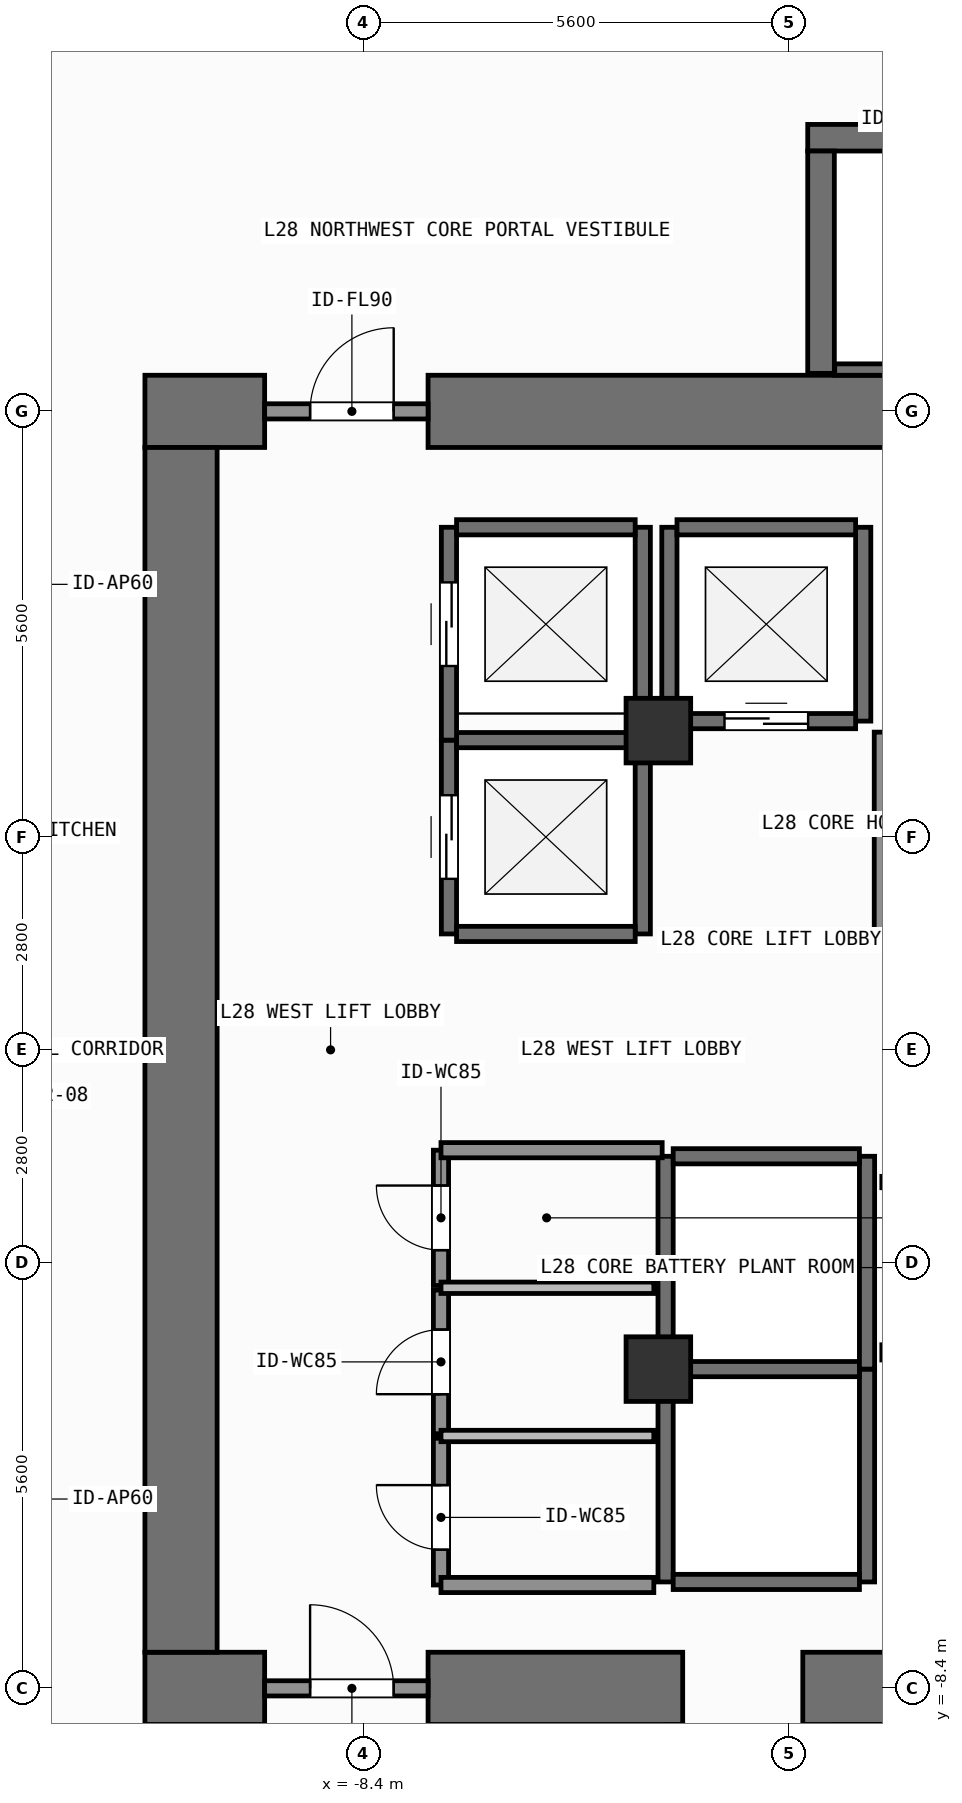
"""IFC4 building model, lengths in metres.
Left out: names, types, materials, properties, quantities, classifications, styles, units other than length and angle.
Written with IfcOpenShell. Run it as: python <this file> out.ifc"""

import sys

from ifc_helpers import new_model, si_unit, direction, frame, frame_2d, origin, origin_2d, place, context, subcontext, project, spatial, rectangle, extrude, element, fill, save


model = new_model("IFC4")
c1 = context("Model", 3, precision=1e-05, world=origin(), true_north=direction((0.0, 1.0)))
c2 = subcontext(c1, "Body", "Model", "MODEL_VIEW")
j1 = project(units=[si_unit("LENGTHUNIT", "METRE"), si_unit("PLANEANGLEUNIT", "RADIAN")], contexts=[c1])
p1 = place(None, origin())
s1 = spatial("IfcSite", under=j1, at=p1, CompositionType="ELEMENT")
p2 = place(p1, origin())
s2 = spatial("IfcBuilding", under=s1, at=p2, CompositionType="ELEMENT")
p3 = place(p2, frame((0.0, 0.0, 113.4)))
s3 = spatial("IfcBuildingStorey", under=s2, at=p3, CompositionType="ELEMENT", Elevation=113.4)
p4 = place(p3, frame((-11.275, -8.4, 0.0), z_axis=(0.0, 0.0, 1.0), x_axis=(1.0, 0.0, 0.0)))
e1 = element("IfcWall", 1, at=p4, inside=s3, PredefinedType="SHEAR", context=c2, shape_type="SweptSolid", body=[
    extrude(rectangle(XDim=1.575, YDim=0.95, at=frame_2d((0.788, 0.0))), origin(), (0.0, 0.0, 1.0), 3.9),
])
p5 = place(p3, frame((-7.55, -8.4, 0.0), z_axis=(0.0, 0.0, 1.0), x_axis=(1.0, 0.0, 0.0)))
e2 = element("IfcWall", 2, at=p5, inside=s3, PredefinedType="SHEAR", context=c2, shape_type="SweptSolid", body=[
    extrude(rectangle(XDim=3.35, YDim=0.95, at=frame_2d((1.675, 0.0))), origin(), (0.0, 0.0, 1.0), 3.9),
])
p6 = place(p3, frame((-2.62, -8.4, 0.0), z_axis=(0.0, 0.0, 1.0), x_axis=(1.0, 0.0, 0.0)))
e3 = element("IfcWall", 3, at=p6, inside=s3, PredefinedType="SHEAR", context=c2, shape_type="SweptSolid", body=[
    extrude(rectangle(XDim=7.27, YDim=0.95, at=frame_2d((3.635, 0.0))), origin(), (0.0, 0.0, 1.0), 3.9),
])
p7 = place(p3, frame((-11.275, 8.4, 0.0), z_axis=(0.0, 0.0, 1.0), x_axis=(1.0, 0.0, 0.0)))
e4 = element("IfcWall", 4, at=p7, inside=s3, PredefinedType="SHEAR", context=c2, shape_type="SweptSolid", body=[
    extrude(rectangle(XDim=1.575, YDim=0.95, at=frame_2d((0.788, 0.0))), origin(), (0.0, 0.0, 1.0), 3.9),
])
p8 = place(p3, frame((-7.55, 8.4, 0.0), z_axis=(0.0, 0.0, 1.0), x_axis=(1.0, 0.0, 0.0)))
e5 = element("IfcWall", 5, at=p8, inside=s3, PredefinedType="SHEAR", context=c2, shape_type="SweptSolid", body=[
    extrude(rectangle(XDim=16.425, YDim=0.95, at=frame_2d((8.212, 0.0))), origin(), (0.0, 0.0, 1.0), 3.9),
])
p9 = place(p3, frame((-10.8, -7.925, 0.0), z_axis=(0.0, 0.0, 1.0), x_axis=(0.0, 1.0, 0.0)))
e6 = element("IfcWall", 6, at=p9, inside=s3, PredefinedType="SHEAR", context=c2, shape_type="SweptSolid", body=[
    extrude(rectangle(XDim=15.85, YDim=0.95, at=frame_2d((7.925, 0.0))), origin(), (0.0, 0.0, 1.0), 3.9),
])
p10 = place(p3, frame((-2.555, 12.0, 0.0), z_axis=(0.0, 0.0, 1.0), x_axis=(1.0, 0.0, 0.0)))
e7 = element("IfcWall", 7, at=p10, inside=s3, PredefinedType="SHEAR", context=c2, shape_type="SweptSolid", body=[
    extrude(rectangle(XDim=7.31, YDim=0.35, at=frame_2d((3.655, 0.0))), origin(), (0.0, 0.0, 1.0), 3.9),
])
p11 = place(p3, frame((-2.2, 8.95, 0.0), z_axis=(0.0, 0.0, 1.0), x_axis=(1.0, 0.0, 0.0)))
e8 = element("IfcWall", 8, at=p11, inside=s3, PredefinedType="SHEAR", context=c2, shape_type="SweptSolid", body=[
    extrude(rectangle(XDim=6.6, YDim=0.15, at=frame_2d((3.3, 0.0))), origin(), (0.0, 0.0, 1.0), 3.9),
])
p12 = place(p3, frame((-2.38, 8.9, 0.0), z_axis=(0.0, 0.0, 1.0), x_axis=(0.0, 1.0, 0.0)))
e9 = element("IfcWall", 9, at=p12, inside=s3, PredefinedType="SHEAR", context=c2, shape_type="SweptSolid", body=[
    extrude(rectangle(XDim=2.925, YDim=0.35, at=frame_2d((1.462, 0.0))), origin(), (0.0, 0.0, 1.0), 3.9),
])
for number, where, z_axis, x_axis in (
    (10, (-4.52, -4.2, 0.0), (0.0, 0.0, 1.0), (1.0, 0.0, 0.0)),
    (11, (-4.52, 4.2, 0.0), (0.0, 0.0, 1.0), (1.0, 0.0, 0.0)),
):
    element("IfcColumn", number, at=place(p3, frame(where, z_axis=z_axis, x_axis=x_axis)), inside=s3, PredefinedType="COLUMN", context=c2, shape_type="SweptSolid", body=[
        extrude(rectangle(XDim=0.85, YDim=0.85, at=origin_2d()), origin(), (0.0, 0.0, 1.0), 3.9),
    ])
p13 = place(p3, frame((-7.275, 1.525, 0.0), z_axis=(0.0, 0.0, 1.0), x_axis=(0.0, 1.0, 0.0)))
e12 = element("IfcWall", 12, at=p13, inside=s3, PredefinedType="SHEAR", context=c2, shape_type="SweptSolid", body=[
    extrude(rectangle(XDim=2.55, YDim=0.2, at=frame_2d((1.275, 0.0))), origin(), (0.0, 0.0, 1.0), 3.68),
])
p14 = place(p13, frame((0.725, 0.0, 0.0)))
e13 = element("IfcOpeningElement", 13, at=p14, cuts=e12, PredefinedType="OPENING", context=c2, shape_type="SweptSolid", body=[
    extrude(rectangle(XDim=1.1, YDim=2.2, at=frame_2d((0.55, 1.1))), frame((0.0, 0.11, 0.0), z_axis=(0.0, -1.0, 0.0), x_axis=(1.0, 0.0, 0.0)), (0.0, 0.0, 1.0), 0.22),
])
p15 = place(p3, frame((-4.725, 1.525, 0.0), z_axis=(0.0, 0.0, 1.0), x_axis=(0.0, 1.0, 0.0)))
e14 = element("IfcWall", 14, at=p15, inside=s3, PredefinedType="SHEAR", context=c2, shape_type="SweptSolid", body=[
    extrude(rectangle(XDim=2.55, YDim=0.2, at=frame_2d((1.275, 0.0))), origin(), (0.0, 0.0, 1.0), 3.68),
])
for number, where, z_axis, x_axis in (
    (15, (-7.175, 1.525, 0.0), (0.0, 0.0, 1.0), (1.0, 0.0, 0.0)),
    (16, (-7.175, 4.075, 0.0), (0.0, 0.0, 1.0), (1.0, 0.0, 0.0)),
):
    element("IfcWall", number, at=place(p3, frame(where, z_axis=z_axis, x_axis=x_axis)), inside=s3, PredefinedType="SHEAR", context=c2, shape_type="SweptSolid", body=[
        extrude(rectangle(XDim=2.35, YDim=0.2, at=frame_2d((1.175, 0.0))), origin(), (0.0, 0.0, 1.0), 3.68),
    ])
p16 = place(p3, frame((-7.275, 4.075, 0.0), z_axis=(0.0, 0.0, 1.0), x_axis=(0.0, 1.0, 0.0)))
e17 = element("IfcWall", 17, at=p16, inside=s3, PredefinedType="SHEAR", context=c2, shape_type="SweptSolid", body=[
    extrude(rectangle(XDim=2.8, YDim=0.2, at=frame_2d((1.4, 0.0))), origin(), (0.0, 0.0, 1.0), 3.68),
])
p17 = place(p16, frame((0.975, 0.0, 0.0)))
e18 = element("IfcOpeningElement", 18, at=p17, cuts=e17, PredefinedType="OPENING", context=c2, shape_type="SweptSolid", body=[
    extrude(rectangle(XDim=1.1, YDim=2.2, at=frame_2d((0.55, 1.1))), frame((0.0, 0.11, 0.0), z_axis=(0.0, -1.0, 0.0), x_axis=(1.0, 0.0, 0.0)), (0.0, 0.0, 1.0), 0.22),
])
p18 = place(p3, frame((-4.725, 4.075, 0.0), z_axis=(0.0, 0.0, 1.0), x_axis=(0.0, 1.0, 0.0)))
e19 = element("IfcWall", 19, at=p18, inside=s3, PredefinedType="SHEAR", context=c2, shape_type="SweptSolid", body=[
    extrude(rectangle(XDim=2.8, YDim=0.2, at=frame_2d((1.4, 0.0))), origin(), (0.0, 0.0, 1.0), 3.68),
])
p19 = place(p3, frame((-7.175, 6.875, 0.0), z_axis=(0.0, 0.0, 1.0), x_axis=(1.0, 0.0, 0.0)))
e20 = element("IfcWall", 20, at=p19, inside=s3, PredefinedType="SHEAR", context=c2, shape_type="SweptSolid", body=[
    extrude(rectangle(XDim=2.35, YDim=0.2, at=frame_2d((1.175, 0.0))), origin(), (0.0, 0.0, 1.0), 3.68),
])
for number, where, z_axis, x_axis in (
    (21, (-4.375, 4.325, 0.0), (0.0, 0.0, 1.0), (0.0, 1.0, 0.0)),
    (22, (-1.825, 4.325, 0.0), (0.0, 0.0, 1.0), (0.0, 1.0, 0.0)),
):
    element("IfcWall", number, at=place(p3, frame(where, z_axis=z_axis, x_axis=x_axis)), inside=s3, PredefinedType="SHEAR", context=c2, shape_type="SweptSolid", body=[
        extrude(rectangle(XDim=2.55, YDim=0.2, at=frame_2d((1.275, 0.0))), origin(), (0.0, 0.0, 1.0), 3.68),
    ])
p20 = place(p3, frame((-4.275, 4.325, 0.0), z_axis=(0.0, 0.0, 1.0), x_axis=(1.0, 0.0, 0.0)))
e23 = element("IfcWall", 23, at=p20, inside=s3, PredefinedType="SHEAR", context=c2, shape_type="SweptSolid", body=[
    extrude(rectangle(XDim=2.35, YDim=0.2, at=frame_2d((1.175, 0.0))), origin(), (0.0, 0.0, 1.0), 3.68),
])
p21 = place(p20, frame((0.625, 0.0, 0.0)))
e24 = element("IfcOpeningElement", 24, at=p21, cuts=e23, PredefinedType="OPENING", context=c2, shape_type="SweptSolid", body=[
    extrude(rectangle(XDim=1.1, YDim=2.2, at=frame_2d((0.55, 1.1))), frame((0.0, 0.11, 0.0), z_axis=(0.0, -1.0, 0.0), x_axis=(1.0, 0.0, 0.0)), (0.0, 0.0, 1.0), 0.22),
])
p22 = place(p3, frame((-4.275, 6.875, 0.0), z_axis=(0.0, 0.0, 1.0), x_axis=(1.0, 0.0, 0.0)))
e25 = element("IfcWall", 25, at=p22, inside=s3, PredefinedType="SHEAR", context=c2, shape_type="SweptSolid", body=[
    extrude(rectangle(XDim=2.35, YDim=0.2, at=frame_2d((1.175, 0.0))), origin(), (0.0, 0.0, 1.0), 3.68),
])
for number, where, z_axis, x_axis in (
    (26, (-4.425, -7.0, 0.0), (0.0, 0.0, 1.0), (0.0, 1.0, 0.0)),
    (27, (-1.775, -7.0, 0.0), (0.0, 0.0, 1.0), (0.0, 1.0, 0.0)),
):
    element("IfcWall", number, at=place(p3, frame(where, z_axis=z_axis, x_axis=x_axis)), inside=s3, PredefinedType="SHEAR", context=c2, shape_type="SweptSolid", body=[
        extrude(rectangle(XDim=2.8, YDim=0.2, at=frame_2d((1.4, 0.0))), origin(), (0.0, 0.0, 1.0), 3.68),
    ])
for number, where, z_axis, x_axis in (
    (28, (-4.325, -7.0, 0.0), (0.0, 0.0, 1.0), (1.0, 0.0, 0.0)),
    (29, (-4.325, -4.2, 0.0), (0.0, 0.0, 1.0), (1.0, 0.0, 0.0)),
):
    element("IfcWall", number, at=place(p3, frame(where, z_axis=z_axis, x_axis=x_axis)), inside=s3, PredefinedType="SHEAR", context=c2, shape_type="SweptSolid", body=[
        extrude(rectangle(XDim=2.45, YDim=0.2, at=frame_2d((1.225, 0.0))), origin(), (0.0, 0.0, 1.0), 3.68),
    ])
for number, where, z_axis, x_axis in (
    (30, (-4.425, -4.2, 0.0), (0.0, 0.0, 1.0), (0.0, 1.0, 0.0)),
    (31, (-1.775, -4.2, 0.0), (0.0, 0.0, 1.0), (0.0, 1.0, 0.0)),
):
    element("IfcWall", number, at=place(p3, frame(where, z_axis=z_axis, x_axis=x_axis)), inside=s3, PredefinedType="SHEAR", context=c2, shape_type="SweptSolid", body=[
        extrude(rectangle(XDim=2.8, YDim=0.2, at=frame_2d((1.4, 0.0))), origin(), (0.0, 0.0, 1.0), 3.68),
    ])
p23 = place(p3, frame((-4.325, -1.4, 0.0), z_axis=(0.0, 0.0, 1.0), x_axis=(1.0, 0.0, 0.0)))
e32 = element("IfcWall", 32, at=p23, inside=s3, PredefinedType="SHEAR", context=c2, shape_type="SweptSolid", body=[
    extrude(rectangle(XDim=2.45, YDim=0.2, at=frame_2d((1.225, 0.0))), origin(), (0.0, 0.0, 1.0), 3.68),
])
p24 = place(p3, frame((-9.7, -8.4, 0.0), z_axis=(0.0, 0.0, 1.0), x_axis=(1.0, 0.0, 0.0)))
e33 = element("IfcWall", 33, at=p24, inside=s3, PredefinedType="SOLIDWALL", context=c2, shape_type="SweptSolid", body=[
    extrude(rectangle(XDim=2.15, YDim=0.2, at=frame_2d((1.075, 0.0))), origin(), (0.0, 0.0, 1.0), 2.72),
])
p25 = place(p24, frame((0.598, 0.0, 0.0)))
e34 = element("IfcOpeningElement", 34, at=p25, cuts=e33, PredefinedType="OPENING", context=c2, shape_type="SweptSolid", body=[
    extrude(rectangle(XDim=1.1, YDim=2.15, at=frame_2d((0.55, 1.075))), frame((0.0, 0.11, 0.0), z_axis=(0.0, -1.0, 0.0), x_axis=(1.0, 0.0, 0.0)), (0.0, 0.0, 1.0), 0.22),
])
p26 = place(p3, frame((-9.7, 8.4, 0.0), z_axis=(0.0, 0.0, 1.0), x_axis=(1.0, 0.0, 0.0)))
e35 = element("IfcWall", 35, at=p26, inside=s3, PredefinedType="SOLIDWALL", context=c2, shape_type="SweptSolid", body=[
    extrude(rectangle(XDim=2.15, YDim=0.2, at=frame_2d((1.075, 0.0))), origin(), (0.0, 0.0, 1.0), 2.72),
])
p27 = place(p26, frame((0.598, 0.0, 0.0)))
e36 = element("IfcOpeningElement", 36, at=p27, cuts=e35, PredefinedType="OPENING", context=c2, shape_type="SweptSolid", body=[
    extrude(rectangle(XDim=1.1, YDim=2.15, at=frame_2d((0.55, 1.075))), frame((0.0, 0.11, 0.0), z_axis=(0.0, -1.0, 0.0), x_axis=(1.0, 0.0, 0.0)), (0.0, 0.0, 1.0), 0.22),
])
p28 = place(p3, frame((-7.38, -7.04, 0.0), z_axis=(0.0, 0.0, 1.0), x_axis=(0.0, 1.0, 0.0)))
e37 = element("IfcWall", 37, at=p28, inside=s3, PredefinedType="SOLIDWALL", context=c2, shape_type="SweptSolid", body=[
    extrude(rectangle(XDim=1.93, YDim=0.2, at=frame_2d((0.965, 0.0))), origin(), (0.0, 0.0, 1.0), 3.68),
])
p29 = place(p28, frame((0.464, 0.0, 0.0)))
e38 = element("IfcOpeningElement", 38, at=p29, cuts=e37, PredefinedType="OPENING", context=c2, shape_type="SweptSolid", body=[
    extrude(rectangle(XDim=0.85, YDim=2.1, at=frame_2d((0.425, 1.05))), frame((0.0, 0.11, 0.0), z_axis=(0.0, -1.0, 0.0), x_axis=(1.0, 0.0, 0.0)), (0.0, 0.0, 1.0), 0.22),
])
p30 = place(p3, frame((-7.38, -5.05, 0.0), z_axis=(0.0, 0.0, 1.0), x_axis=(0.0, 1.0, 0.0)))
e39 = element("IfcWall", 39, at=p30, inside=s3, PredefinedType="SOLIDWALL", context=c2, shape_type="SweptSolid", body=[
    extrude(rectangle(XDim=1.89, YDim=0.2, at=frame_2d((0.945, 0.0))), origin(), (0.0, 0.0, 1.0), 3.68),
])
p31 = place(p30, frame((0.52, 0.0, 0.0)))
e40 = element("IfcOpeningElement", 40, at=p31, cuts=e39, PredefinedType="OPENING", context=c2, shape_type="SweptSolid", body=[
    extrude(rectangle(XDim=0.85, YDim=2.1, at=frame_2d((0.425, 1.05))), frame((0.0, 0.11, 0.0), z_axis=(0.0, -1.0, 0.0), x_axis=(1.0, 0.0, 0.0)), (0.0, 0.0, 1.0), 0.22),
])
p32 = place(p3, frame((-7.38, -3.1, 0.0), z_axis=(0.0, 0.0, 1.0), x_axis=(0.0, 1.0, 0.0)))
e41 = element("IfcWall", 41, at=p32, inside=s3, PredefinedType="SOLIDWALL", context=c2, shape_type="SweptSolid", body=[
    extrude(rectangle(XDim=1.78, YDim=0.2, at=frame_2d((0.89, 0.0))), origin(), (0.0, 0.0, 1.0), 3.68),
])
p33 = place(p32, frame((0.465, 0.0, 0.0)))
e42 = element("IfcOpeningElement", 42, at=p33, cuts=e41, PredefinedType="OPENING", context=c2, shape_type="SweptSolid", body=[
    extrude(rectangle(XDim=0.85, YDim=2.1, at=frame_2d((0.425, 1.05))), frame((0.0, 0.11, 0.0), z_axis=(0.0, -1.0, 0.0), x_axis=(1.0, 0.0, 0.0)), (0.0, 0.0, 1.0), 0.22),
])
p34 = place(p3, frame((-7.38, -1.32, 0.0), z_axis=(0.0, 0.0, 1.0), x_axis=(1.0, 0.0, 0.0)))
e43 = element("IfcWall", 43, at=p34, inside=s3, PredefinedType="SOLIDWALL", context=c2, shape_type="SweptSolid", body=[
    extrude(rectangle(XDim=2.91, YDim=0.2, at=frame_2d((1.455, 0.0))), origin(), (0.0, 0.0, 1.0), 3.68),
])
p35 = place(p3, frame((-1.58, 1.48, 0.0), z_axis=(0.0, 0.0, 1.0), x_axis=(0.0, 1.0, 0.0)))
e44 = element("IfcWall", 44, at=p35, inside=s3, PredefinedType="SOLIDWALL", context=c2, shape_type="SweptSolid", body=[
    extrude(rectangle(XDim=2.7, YDim=0.2, at=frame_2d((1.35, 0.0))), origin(), (0.0, 0.0, 1.0), 3.68),
])
p36 = place(p3, frame((-7.38, -7.04, 0.0), z_axis=(0.0, 0.0, 1.0), x_axis=(1.0, 0.0, 0.0)))
e45 = element("IfcWall", 45, at=p36, inside=s3, PredefinedType="SOLIDWALL", context=c2, shape_type="SweptSolid", body=[
    extrude(rectangle(XDim=2.8, YDim=0.2, at=frame_2d((1.4, 0.0))), origin(), (0.0, 0.0, 1.0), 3.68),
])
for number, where, z_axis, x_axis in (
    (46, (-7.38, -5.08, 0.0), (0.0, 0.0, 1.0), (1.0, 0.0, 0.0)),
    (47, (-7.38, -3.13, 0.0), (0.0, 0.0, 1.0), (1.0, 0.0, 0.0)),
):
    element("IfcWall", number, at=place(p3, frame(where, z_axis=z_axis, x_axis=x_axis)), inside=s3, PredefinedType="PARTITIONING", context=c2, shape_type="SweptSolid", body=[
        extrude(rectangle(XDim=2.8, YDim=0.15, at=frame_2d((1.4, 0.0))), origin(), (0.0, 0.0, 1.0), 3.68),
    ])
p37 = place(p14, origin())
e48 = element("IfcDoor", 48, at=p37, inside=s3, OperationType="SLIDING_TO_LEFT", PredefinedType="DOOR", context=c2, shape_type="SweptSolid", body=[
    extrude(rectangle(XDim=1.1, YDim=2.2, at=frame_2d((0.55, 1.1))), frame((0.0, 0.025, 0.0), z_axis=(0.0, -1.0, 0.0), x_axis=(1.0, 0.0, 0.0)), (0.0, 0.0, 1.0), 0.05),
])
fill(e13, e48)
p38 = place(p17, origin())
e49 = element("IfcDoor", 49, at=p38, inside=s3, OperationType="SLIDING_TO_LEFT", PredefinedType="DOOR", context=c2, shape_type="SweptSolid", body=[
    extrude(rectangle(XDim=1.1, YDim=2.2, at=frame_2d((0.55, 1.1))), frame((0.0, 0.025, 0.0), z_axis=(0.0, -1.0, 0.0), x_axis=(1.0, 0.0, 0.0)), (0.0, 0.0, 1.0), 0.05),
])
fill(e18, e49)
p39 = place(p21, origin())
e50 = element("IfcDoor", 50, at=p39, inside=s3, OperationType="SLIDING_TO_LEFT", PredefinedType="DOOR", context=c2, shape_type="SweptSolid", body=[
    extrude(rectangle(XDim=1.1, YDim=2.2, at=frame_2d((0.55, 1.1))), frame((0.0, 0.025, 0.0), z_axis=(0.0, -1.0, 0.0), x_axis=(1.0, 0.0, 0.0)), (0.0, 0.0, 1.0), 0.05),
])
fill(e24, e50)
p40 = place(p25, origin())
e51 = element("IfcDoor", 51, at=p40, inside=s3, OperationType="SINGLE_SWING_LEFT", PredefinedType="DOOR", context=c2, shape_type="SweptSolid", body=[
    extrude(rectangle(XDim=1.1, YDim=2.15, at=frame_2d((0.55, 1.075))), frame((0.0, 0.025, 0.0), z_axis=(0.0, -1.0, 0.0), x_axis=(1.0, 0.0, 0.0)), (0.0, 0.0, 1.0), 0.05),
])
fill(e34, e51)
p41 = place(p27, origin())
e52 = element("IfcDoor", 52, at=p41, inside=s3, OperationType="SINGLE_SWING_RIGHT", PredefinedType="DOOR", context=c2, shape_type="SweptSolid", body=[
    extrude(rectangle(XDim=1.1, YDim=2.15, at=frame_2d((0.55, 1.075))), frame((0.0, 0.025, 0.0), z_axis=(0.0, -1.0, 0.0), x_axis=(1.0, 0.0, 0.0)), (0.0, 0.0, 1.0), 0.05),
])
fill(e36, e52)
p42 = place(p29, origin())
e53 = element("IfcDoor", 53, at=p42, inside=s3, OperationType="SINGLE_SWING_RIGHT", PredefinedType="DOOR", context=c2, shape_type="SweptSolid", body=[
    extrude(rectangle(XDim=0.85, YDim=2.1, at=frame_2d((0.425, 1.05))), frame((0.0, 0.025, 0.0), z_axis=(0.0, -1.0, 0.0), x_axis=(1.0, 0.0, 0.0)), (0.0, 0.0, 1.0), 0.05),
])
fill(e38, e53)
p43 = place(p31, origin())
e54 = element("IfcDoor", 54, at=p43, inside=s3, OperationType="SINGLE_SWING_LEFT", PredefinedType="DOOR", context=c2, shape_type="SweptSolid", body=[
    extrude(rectangle(XDim=0.85, YDim=2.1, at=frame_2d((0.425, 1.05))), frame((0.0, 0.025, 0.0), z_axis=(0.0, -1.0, 0.0), x_axis=(1.0, 0.0, 0.0)), (0.0, 0.0, 1.0), 0.05),
])
fill(e40, e54)
p44 = place(p33, origin())
e55 = element("IfcDoor", 55, at=p44, inside=s3, OperationType="SINGLE_SWING_RIGHT", PredefinedType="DOOR", context=c2, shape_type="SweptSolid", body=[
    extrude(rectangle(XDim=0.85, YDim=2.1, at=frame_2d((0.425, 1.05))), frame((0.0, 0.025, 0.0), z_axis=(0.0, -1.0, 0.0), x_axis=(1.0, 0.0, 0.0)), (0.0, 0.0, 1.0), 0.05),
])
fill(e42, e55)
save(model, sys.argv[1])
